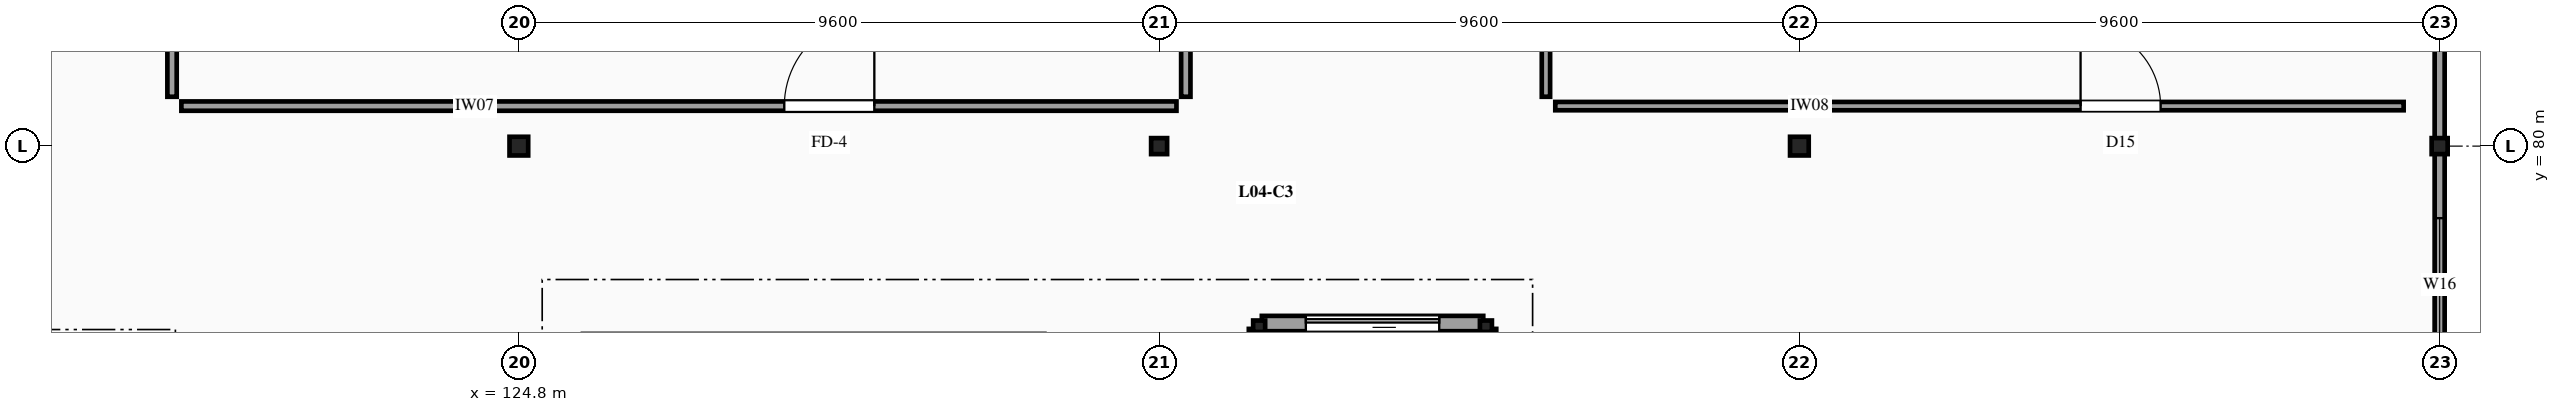
"""IFC4 building model, lengths in metres.
Left out: names, types, materials, properties, quantities, classifications, styles, units other than length and angle.
Written with IfcOpenShell. Run it as: python <this file> out.ifc"""

import sys

from ifc_helpers import new_model, si_unit, direction, frame, frame_2d, origin, origin_2d, place, context, subcontext, project, spatial, rectangle, i_section, extrude, element, fill, save


model = new_model("IFC4")
c1 = context("Model", 3, precision=1e-05, world=origin(), true_north=direction((0.0, 1.0)))
c2 = subcontext(c1, "Body", "Model", "MODEL_VIEW")
j1 = project(units=[si_unit("LENGTHUNIT", "METRE"), si_unit("PLANEANGLEUNIT", "RADIAN")], contexts=[c1])
p1 = place(None, origin())
s1 = spatial("IfcSite", under=j1, at=p1, CompositionType="ELEMENT")
p2 = place(p1, origin())
s2 = spatial("IfcBuilding", under=s1, at=p2, CompositionType="ELEMENT")
p3 = place(p2, frame((0.0, 0.0, 17.4)))
s3 = spatial("IfcBuildingStorey", under=s2, at=p3, CompositionType="ELEMENT", Elevation=17.4)
p4 = place(p3, frame((124.8, 80.0, -0.28), z_axis=(0.0, 0.0, 1.0), x_axis=(1.0, 0.0, 0.0)))
e1 = element("IfcColumn", 1, at=p4, inside=s3, PredefinedType="COLUMN", context=c2, shape_type="SweptSolid", body=[
    extrude(i_section(OverallWidth=0.28, OverallDepth=0.28, WebThickness=0.01, FlangeThickness=0.018, FilletRadius=0.024, at=origin_2d()), origin(), (0.0, 0.0, 1.0), 8.43),
])
p5 = place(p3, frame((134.4, 80.0, -0.28), z_axis=(0.0, 0.0, 1.0), x_axis=(1.0, 0.0, 0.0)))
e2 = element("IfcColumn", 2, at=p5, inside=s3, PredefinedType="COLUMN", context=c2, shape_type="SweptSolid", body=[
    extrude(i_section(OverallWidth=0.24, OverallDepth=0.24, WebThickness=0.01, FlangeThickness=0.017, FilletRadius=0.021, at=origin_2d()), origin(), (0.0, 0.0, 1.0), 8.43),
])
p6 = place(p3, frame((144.0, 80.0, -0.28), z_axis=(0.0, 0.0, 1.0), x_axis=(1.0, 0.0, 0.0)))
e3 = element("IfcColumn", 3, at=p6, inside=s3, PredefinedType="COLUMN", context=c2, shape_type="SweptSolid", body=[
    extrude(i_section(OverallWidth=0.28, OverallDepth=0.28, WebThickness=0.01, FlangeThickness=0.018, FilletRadius=0.024, at=origin_2d()), origin(), (0.0, 0.0, 1.0), 8.43),
])
p7 = place(p3, frame((153.6, 80.0, -0.28), z_axis=(0.0, 0.0, 1.0), x_axis=(1.0, 0.0, 0.0)))
e4 = element("IfcColumn", 4, at=p7, inside=s3, PredefinedType="COLUMN", context=c2, shape_type="SweptSolid", body=[
    extrude(i_section(OverallWidth=0.24, OverallDepth=0.24, WebThickness=0.01, FlangeThickness=0.017, FilletRadius=0.021, at=origin_2d()), origin(), (0.0, 0.0, 1.0), 8.43),
])
for number, where, z_axis, x_axis in (
    (5, (139.3, 77.3, 0.0), (0.0, 0.0, 1.0), (1.0, 0.0, 0.0)),
    (6, (135.9, 77.3, 0.0), (0.0, 0.0, 1.0), (1.0, 0.0, 0.0)),
):
    element("IfcColumn", number, at=place(p3, frame(where, z_axis=z_axis, x_axis=x_axis)), inside=s3, PredefinedType="COLUMN", context=c2, shape_type="SweptSolid", body=[
        extrude(i_section(OverallWidth=0.18, OverallDepth=0.171, WebThickness=0.006, FlangeThickness=0.01, FilletRadius=0.015, at=origin_2d()), origin(), (0.0, 0.0, 1.0), 7.66),
    ])
p8 = place(p3, frame((153.6, 72.02, 0.0), z_axis=(0.0, 0.0, 1.0), x_axis=(0.0, 1.0, 0.0)))
e7 = element("IfcWall", 7, at=p8, inside=s3, PredefinedType="SOLIDWALL", context=c2, shape_type="SweptSolid", body=[
    extrude(rectangle(XDim=7.96, YDim=0.15, at=frame_2d((3.98, 0.0))), origin(), (0.0, 0.0, 1.0), 7.75),
])
p9 = place(p8, frame((4.9, 0.0, 0.9)))
e8 = element("IfcOpeningElement", 8, at=p9, cuts=e7, PredefinedType="OPENING", context=c2, shape_type="SweptSolid", body=[
    extrude(rectangle(XDim=2.0, YDim=2.2, at=frame_2d((1.0, 1.1))), frame((0.0, 0.085, 0.0), z_axis=(0.0, -1.0, 0.0), x_axis=(1.0, 0.0, 0.0)), (0.0, 0.0, 1.0), 0.17),
])
p10 = place(p3, frame((153.6, 80.02, 0.0), z_axis=(0.0, 0.0, 1.0), x_axis=(0.0, 1.0, 0.0)))
e9 = element("IfcWall", 9, at=p10, inside=s3, PredefinedType="SOLIDWALL", context=c2, shape_type="SweptSolid", body=[
    extrude(rectangle(XDim=7.96, YDim=0.15, at=frame_2d((3.98, 0.0))), origin(), (0.0, 0.0, 1.0), 7.75),
])
p11 = place(p10, frame((4.9, 0.0, 0.9)))
e10 = element("IfcOpeningElement", 10, at=p11, cuts=e9, PredefinedType="OPENING", context=c2, shape_type="SweptSolid", body=[
    extrude(rectangle(XDim=1.6, YDim=2.0, at=frame_2d((0.8, 1.0))), frame((0.0, 0.085, 0.0), z_axis=(0.0, -1.0, 0.0), x_axis=(1.0, 0.0, 0.0)), (0.0, 0.0, 1.0), 0.17),
])
p12 = place(p3, frame((135.94, 77.34, 0.0), z_axis=(0.0, 0.0, 1.0), x_axis=(1.0, 0.0, 0.0)))
e11 = element("IfcWall", 11, at=p12, inside=s3, PredefinedType="SOLIDWALL", context=c2, shape_type="SweptSolid", body=[
    extrude(rectangle(XDim=3.32, YDim=0.23, at=frame_2d((1.66, 0.0))), origin(), (0.0, 0.0, 1.0), 7.42),
])
p13 = place(p12, frame((0.66, 0.0, 0.0)))
e12 = element("IfcOpeningElement", 12, at=p13, cuts=e11, PredefinedType="OPENING", context=c2, shape_type="SweptSolid", body=[
    extrude(rectangle(XDim=2.0, YDim=2.5, at=frame_2d((1.0, 1.25))), frame((0.0, 0.125, 0.0), z_axis=(0.0, -1.0, 0.0), x_axis=(1.0, 0.0, 0.0)), (0.0, 0.0, 1.0), 0.25),
])
for number, where, z_axis, x_axis in (
    (13, (135.86, 73.14, 0.0), (0.0, 0.0, 1.0), (0.0, 1.0, 0.0)),
    (14, (139.34, 73.14, 0.0), (0.0, 0.0, 1.0), (0.0, 1.0, 0.0)),
):
    element("IfcWall", number, at=place(p3, frame(where, z_axis=z_axis, x_axis=x_axis)), inside=s3, PredefinedType="SOLIDWALL", context=c2, shape_type="SweptSolid", body=[
        extrude(rectangle(XDim=4.12, YDim=0.23, at=frame_2d((2.06, 0.0))), origin(), (0.0, 0.0, 1.0), 7.42),
    ])
p14 = place(p3, frame((119.74, 80.6, 0.0), z_axis=(0.0, 0.0, 1.0), x_axis=(1.0, 0.0, 0.0)))
e15 = element("IfcWall", 15, at=p14, inside=s3, PredefinedType="PARTITIONING", context=c2, shape_type="SweptSolid", body=[
    extrude(rectangle(XDim=14.92, YDim=0.14, at=frame_2d((7.46, 0.0))), origin(), (0.0, 0.0, 1.0), 7.5),
])
p15 = place(p14, frame((9.04, 0.0, 0.0)))
e16 = element("IfcOpeningElement", 16, at=p15, cuts=e15, PredefinedType="OPENING", context=c2, shape_type="SweptSolid", body=[
    extrude(rectangle(XDim=1.35, YDim=2.2, at=frame_2d((0.675, 1.1))), frame((0.0, 0.08, 0.0), z_axis=(0.0, -1.0, 0.0), x_axis=(1.0, 0.0, 0.0)), (0.0, 0.0, 1.0), 0.16),
])
for number, where, z_axis, x_axis in (
    (17, (119.6, 80.74, 0.0), (0.0, 0.0, 1.0), (0.0, 1.0, 0.0)),
    (18, (134.8, 80.74, 0.0), (0.0, 0.0, 1.0), (0.0, 1.0, 0.0)),
):
    element("IfcWall", number, at=place(p3, frame(where, z_axis=z_axis, x_axis=x_axis)), inside=s3, PredefinedType="PARTITIONING", context=c2, shape_type="SweptSolid", body=[
        extrude(rectangle(XDim=15.09, YDim=0.14, at=frame_2d((7.545, 0.0))), origin(), (0.0, 0.0, 1.0), 7.5),
    ])
p16 = place(p3, frame((140.34, 80.6, 0.0), z_axis=(0.0, 0.0, 1.0), x_axis=(1.0, 0.0, 0.0)))
e19 = element("IfcWall", 19, at=p16, inside=s3, PredefinedType="PARTITIONING", context=c2, shape_type="SweptSolid", body=[
    extrude(rectangle(XDim=12.72, YDim=0.125, at=frame_2d((6.36, 0.0))), origin(), (0.0, 0.0, 1.0), 7.5),
])
p17 = place(p16, frame((7.876, 0.0, 0.0)))
e20 = element("IfcOpeningElement", 20, at=p17, cuts=e19, PredefinedType="OPENING", context=c2, shape_type="SweptSolid", body=[
    extrude(rectangle(XDim=1.2, YDim=2.18, at=frame_2d((0.6, 1.09))), frame((0.0, 0.073, 0.0), z_axis=(0.0, -1.0, 0.0), x_axis=(1.0, 0.0, 0.0)), (0.0, 0.0, 1.0), 0.145),
])
p18 = place(p3, frame((140.2, 80.74, 0.0), z_axis=(0.0, 0.0, 1.0), x_axis=(0.0, 1.0, 0.0)))
e21 = element("IfcWall", 21, at=p18, inside=s3, PredefinedType="PARTITIONING", context=c2, shape_type="SweptSolid", body=[
    extrude(rectangle(XDim=15.09, YDim=0.125, at=frame_2d((7.545, 0.0))), origin(), (0.0, 0.0, 1.0), 7.5),
])
p19 = place(p9, origin())
e22 = element("IfcWindow", 22, at=p19, inside=s3, PartitioningType="SINGLE_PANEL", PredefinedType="WINDOW", context=c2, shape_type="SweptSolid", body=[
    extrude(rectangle(XDim=2.0, YDim=2.2, at=frame_2d((1.0, 1.1))), frame((0.0, 0.03, 0.0), z_axis=(0.0, -1.0, 0.0), x_axis=(1.0, 0.0, 0.0)), (0.0, 0.0, 1.0), 0.06),
])
fill(e8, e22)
p20 = place(p13, origin())
e23 = element("IfcDoor", 23, at=p20, inside=s3, OperationType="SLIDING_TO_RIGHT", PredefinedType="DOOR", context=c2, shape_type="SweptSolid", body=[
    extrude(rectangle(XDim=2.0, YDim=2.5, at=frame_2d((1.0, 1.25))), frame((0.0, 0.025, 0.0), z_axis=(0.0, -1.0, 0.0), x_axis=(1.0, 0.0, 0.0)), (0.0, 0.0, 1.0), 0.05),
])
fill(e12, e23)
p21 = place(p15, origin())
e24 = element("IfcDoor", 24, at=p21, inside=s3, OperationType="SINGLE_SWING_RIGHT", PredefinedType="DOOR", context=c2, shape_type="SweptSolid", body=[
    extrude(rectangle(XDim=1.35, YDim=2.2, at=frame_2d((0.675, 1.1))), frame((0.0, 0.025, 0.0), z_axis=(0.0, -1.0, 0.0), x_axis=(1.0, 0.0, 0.0)), (0.0, 0.0, 1.0), 0.05),
])
fill(e16, e24)
p22 = place(p17, origin())
e25 = element("IfcDoor", 25, at=p22, inside=s3, OperationType="SINGLE_SWING_LEFT", PredefinedType="DOOR", context=c2, shape_type="SweptSolid", body=[
    extrude(rectangle(XDim=1.2, YDim=2.18, at=frame_2d((0.6, 1.09))), frame((0.0, 0.025, 0.0), z_axis=(0.0, -1.0, 0.0), x_axis=(1.0, 0.0, 0.0)), (0.0, 0.0, 1.0), 0.05),
])
fill(e20, e25)
save(model, sys.argv[1])
